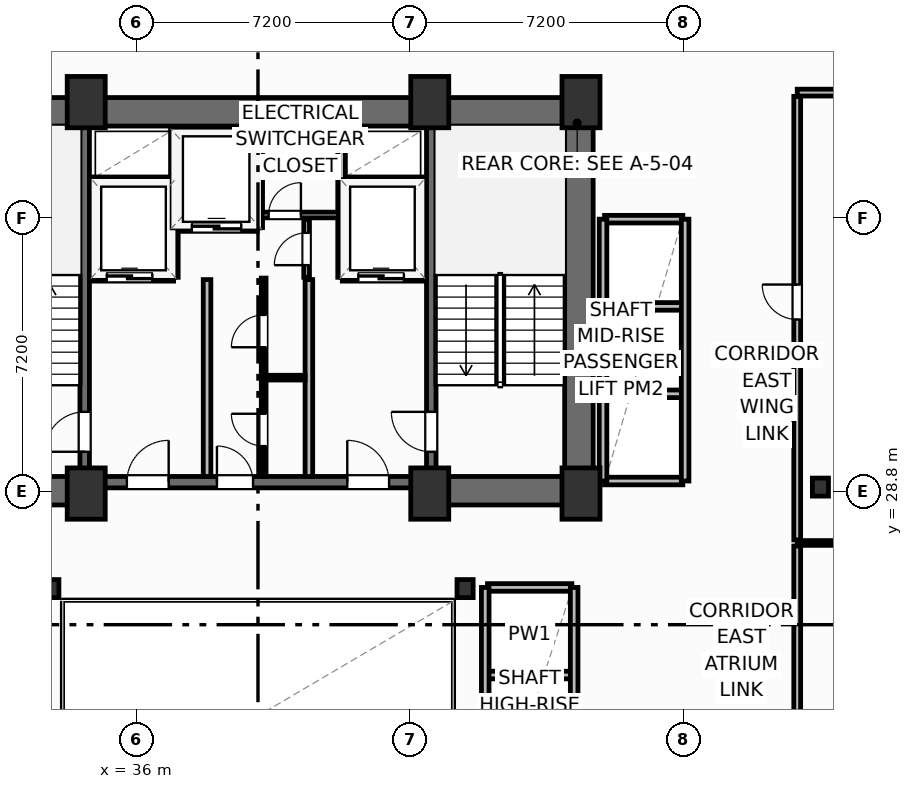
"""IFC4 building model, lengths in metres.
Left out: names, types, materials, properties, quantities, classifications, styles, units other than length and angle.
Written with IfcOpenShell. Run it as: python <this file> out.ifc"""

import sys

from ifc_helpers import new_model, si_unit, direction, frame, frame_2d, origin, origin_2d, place, context, subcontext, project, spatial, rectangle, i_section, extrude, element, fill, save


model = new_model("IFC4")
c1 = context("Model", 3, precision=1e-05, world=origin(), true_north=direction((0.0, 1.0)))
c2 = subcontext(c1, "Body", "Model", "MODEL_VIEW")
j1 = project(units=[si_unit("LENGTHUNIT", "METRE"), si_unit("PLANEANGLEUNIT", "RADIAN")], contexts=[c1])
p1 = place(None, origin())
s1 = spatial("IfcSite", under=j1, at=p1, CompositionType="ELEMENT")
p2 = place(p1, origin())
s2 = spatial("IfcBuilding", under=s1, at=p2, CompositionType="ELEMENT")
p3 = place(p2, frame((0.0, 0.0, 91.0)))
s3 = spatial("IfcBuildingStorey", under=s2, at=p3, CompositionType="ELEMENT", Elevation=91.0)
for number, where, z_axis, x_axis in (
    (1, (34.68, 28.75, 0.0), (0.0, 0.0, 1.0), (1.0, 0.0, 0.0)),
    (2, (43.72, 28.75, 0.0), (0.0, 0.0, 1.0), (1.0, 0.0, 0.0)),
    (3, (47.7, 28.75, 0.0), (0.0, 0.0, 1.0), (1.0, 0.0, 0.0)),
    (4, (34.68, 39.05, 0.0), (0.0, 0.0, 1.0), (1.0, 0.0, 0.0)),
    (5, (43.72, 39.05, 0.0), (0.0, 0.0, 1.0), (1.0, 0.0, 0.0)),
    (6, (47.7, 39.05, 0.0), (0.0, 0.0, 1.0), (1.0, 0.0, 0.0)),
):
    element("IfcColumn", number, at=place(p3, frame(where, z_axis=z_axis, x_axis=x_axis)), inside=s3, PredefinedType="COLUMN", context=c2, shape_type="SweptSolid", body=[
        extrude(rectangle(XDim=1.0, YDim=1.35, at=origin_2d()), origin(), (0.0, 0.0, 1.0), 3.7),
    ])
for number, where, z_axis, x_axis in (
    (7, (33.75, 26.25, 0.0), (0.0, 0.0, 1.0), (1.0, 0.0, 0.0)),
    (8, (44.65, 26.25, 0.0), (0.0, 0.0, 1.0), (1.0, 0.0, 0.0)),
    (9, (54.0, 28.92, 0.0), (0.0, 0.0, 1.0), (1.0, 0.0, 0.0)),
):
    element("IfcColumn", number, at=place(p3, frame(where, z_axis=z_axis, x_axis=x_axis)), inside=s3, PredefinedType="COLUMN", context=c2, shape_type="SweptSolid", body=[
        extrude(i_section(OverallWidth=0.424, OverallDepth=0.474, WebThickness=0.048, FlangeThickness=0.077, FilletRadius=0.025, at=origin_2d()), origin(), (0.0, 0.0, 1.0), 3.7),
    ])
p4 = place(p3, frame((30.38, 38.795, 0.0), z_axis=(0.0, 0.0, 1.0), x_axis=(1.0, 0.0, 0.0)))
e10 = element("IfcWall", 10, at=p4, inside=s3, PredefinedType="SHEAR", context=c2, shape_type="SweptSolid", body=[
    extrude(rectangle(XDim=17.64, YDim=0.75, at=frame_2d((8.82, 0.0))), origin(), (0.0, 0.0, 1.0), 3.45),
])
p5 = place(p3, frame((47.645, 29.2, 0.0), z_axis=(0.0, 0.0, 1.0), x_axis=(0.0, 1.0, 0.0)))
e11 = element("IfcWall", 11, at=p5, inside=s3, PredefinedType="SHEAR", context=c2, shape_type="SweptSolid", body=[
    extrude(rectangle(XDim=9.22, YDim=0.75, at=frame_2d((4.61, 0.0))), origin(), (0.0, 0.0, 1.0), 3.45),
])
p6 = place(p3, frame((30.38, 28.825, 0.0), z_axis=(0.0, 0.0, 1.0), x_axis=(1.0, 0.0, 0.0)))
e12 = element("IfcWall", 12, at=p6, inside=s3, PredefinedType="SHEAR", context=c2, shape_type="SweptSolid", body=[
    extrude(rectangle(XDim=4.42, YDim=0.75, at=frame_2d((2.21, 0.0))), origin(), (0.0, 0.0, 1.0), 3.45),
])
p7 = place(p3, frame((43.6, 28.825, 0.0), z_axis=(0.0, 0.0, 1.0), x_axis=(1.0, 0.0, 0.0)))
e13 = element("IfcWall", 13, at=p7, inside=s3, PredefinedType="SHEAR", context=c2, shape_type="SweptSolid", body=[
    extrude(rectangle(XDim=4.42, YDim=0.75, at=frame_2d((2.21, 0.0))), origin(), (0.0, 0.0, 1.0), 3.45),
])
p8 = place(p3, frame((34.8, 29.05, 0.0), z_axis=(0.0, 0.0, 1.0), x_axis=(1.0, 0.0, 0.0)))
e14 = element("IfcWall", 14, at=p8, inside=s3, PredefinedType="SHEAR", context=c2, shape_type="SweptSolid", body=[
    extrude(rectangle(XDim=8.8, YDim=0.3, at=frame_2d((4.4, 0.0))), origin(), (0.0, 0.0, 1.0), 3.45),
])
p9 = place(p8, frame((0.95, 0.0, 0.0)))
e15 = element("IfcOpeningElement", 15, at=p9, cuts=e14, PredefinedType="OPENING", context=c2, shape_type="SweptSolid", body=[
    extrude(rectangle(XDim=1.1, YDim=2.15, at=frame_2d((0.55, 1.075))), frame((0.0, 0.16, 0.0), z_axis=(0.0, -1.0, 0.0), x_axis=(1.0, 0.0, 0.0)), (0.0, 0.0, 1.0), 0.32),
])
p10 = place(p8, frame((6.75, 0.0, 0.0)))
e16 = element("IfcOpeningElement", 16, at=p10, cuts=e14, PredefinedType="OPENING", context=c2, shape_type="SweptSolid", body=[
    extrude(rectangle(XDim=1.1, YDim=2.15, at=frame_2d((0.55, 1.075))), frame((0.0, 0.16, 0.0), z_axis=(0.0, -1.0, 0.0), x_axis=(1.0, 0.0, 0.0)), (0.0, 0.0, 1.0), 0.32),
])
p11 = place(p8, frame((3.32, 0.0, 0.0)))
e17 = element("IfcOpeningElement", 17, at=p11, cuts=e14, PredefinedType="OPENING", context=c2, shape_type="SweptSolid", body=[
    extrude(rectangle(XDim=0.95, YDim=2.15, at=frame_2d((0.475, 1.075))), frame((0.0, 0.16, 0.0), z_axis=(0.0, -1.0, 0.0), x_axis=(1.0, 0.0, 0.0)), (0.0, 0.0, 1.0), 0.32),
])
p12 = place(p3, frame((34.64, 29.2, 0.0), z_axis=(0.0, 0.0, 1.0), x_axis=(0.0, 1.0, 0.0)))
e18 = element("IfcWall", 18, at=p12, inside=s3, PredefinedType="SHEAR", context=c2, shape_type="SweptSolid", body=[
    extrude(rectangle(XDim=9.22, YDim=0.25, at=frame_2d((4.61, 0.0))), origin(), (0.0, 0.0, 1.0), 3.45),
])
p13 = place(p12, frame((0.65, 0.0, 0.0)))
e19 = element("IfcOpeningElement", 19, at=p13, cuts=e18, PredefinedType="OPENING", context=c2, shape_type="SweptSolid", body=[
    extrude(rectangle(XDim=1.05, YDim=2.15, at=frame_2d((0.525, 1.075))), frame((0.0, 0.135, 0.0), z_axis=(0.0, -1.0, 0.0), x_axis=(1.0, 0.0, 0.0)), (0.0, 0.0, 1.0), 0.27),
])
p14 = place(p3, frame((43.76, 29.2, 0.0), z_axis=(0.0, 0.0, 1.0), x_axis=(0.0, 1.0, 0.0)))
e20 = element("IfcWall", 20, at=p14, inside=s3, PredefinedType="SHEAR", context=c2, shape_type="SweptSolid", body=[
    extrude(rectangle(XDim=9.22, YDim=0.25, at=frame_2d((4.61, 0.0))), origin(), (0.0, 0.0, 1.0), 3.45),
])
p15 = place(p14, frame((0.65, 0.0, 0.0)))
e21 = element("IfcOpeningElement", 21, at=p15, cuts=e20, PredefinedType="OPENING", context=c2, shape_type="SweptSolid", body=[
    extrude(rectangle(XDim=1.05, YDim=2.15, at=frame_2d((0.525, 1.075))), frame((0.0, 0.135, 0.0), z_axis=(0.0, -1.0, 0.0), x_axis=(1.0, 0.0, 0.0)), (0.0, 0.0, 1.0), 0.27),
])
p16 = place(p3, frame((53.39, 19.3, 0.0), z_axis=(0.0, 0.0, 1.0), x_axis=(0.0, 1.0, 0.0)))
e22 = element("IfcWall", 22, at=p16, inside=s3, PredefinedType="PARTITIONING", context=c2, shape_type="SweptSolid", body=[
    extrude(rectangle(XDim=8.07, YDim=0.18, at=frame_2d((4.035, 0.0))), origin(), (0.0, 0.0, 1.0), 3.45),
])
p17 = place(p16, frame((2.2, 0.0, 0.0)))
e23 = element("IfcOpeningElement", 23, at=p17, cuts=e22, PredefinedType="OPENING", context=c2, shape_type="SweptSolid", body=[
    extrude(rectangle(XDim=0.92, YDim=2.05, at=frame_2d((0.46, 1.025))), frame((0.0, 0.1, 0.0), z_axis=(0.0, -1.0, 0.0), x_axis=(1.0, 0.0, 0.0)), (0.0, 0.0, 1.0), 0.2),
])
p18 = place(p3, frame((53.39, 27.53, 0.0), z_axis=(0.0, 0.0, 1.0), x_axis=(0.0, 1.0, 0.0)))
e24 = element("IfcWall", 24, at=p18, inside=s3, PredefinedType="PARTITIONING", context=c2, shape_type="SweptSolid", body=[
    extrude(rectangle(XDim=11.67, YDim=0.18, at=frame_2d((5.835, 0.0))), origin(), (0.0, 0.0, 1.0), 3.45),
])
p19 = place(p18, frame((5.8, 0.0, 0.0)))
e25 = element("IfcOpeningElement", 25, at=p19, cuts=e24, PredefinedType="OPENING", context=c2, shape_type="SweptSolid", body=[
    extrude(rectangle(XDim=0.92, YDim=2.05, at=frame_2d((0.46, 1.025))), frame((0.0, 0.1, 0.0), z_axis=(0.0, -1.0, 0.0), x_axis=(1.0, 0.0, 0.0)), (0.0, 0.0, 1.0), 0.2),
])
p20 = place(p3, frame((53.39, 27.45, 0.0), z_axis=(0.0, 0.0, 1.0), x_axis=(1.0, 0.0, 0.0)))
e26 = element("IfcWall", 26, at=p20, inside=s3, PredefinedType="PARTITIONING", context=c2, shape_type="SweptSolid", body=[
    extrude(rectangle(XDim=23.61, YDim=0.125, at=frame_2d((11.805, 0.0))), origin(), (0.0, 0.0, 1.0), 3.45),
])
p21 = place(p3, frame((53.39, 39.3, 0.0), z_axis=(0.0, 0.0, 1.0), x_axis=(1.0, 0.0, 0.0)))
e27 = element("IfcWall", 27, at=p21, inside=s3, PredefinedType="PARTITIONING", context=c2, shape_type="SweptSolid", body=[
    extrude(rectangle(XDim=8.876, YDim=0.18, at=frame_2d((4.438, 0.0))), origin(), (0.0, 0.0, 1.0), 3.45),
])
for number, where, z_axis, x_axis in (
    (28, (37.86, 29.2, 0.0), (0.0, 0.0, 1.0), (0.0, 1.0, 0.0)),
    (29, (40.54, 29.2, 0.0), (0.0, 0.0, 1.0), (0.0, 1.0, 0.0)),
):
    element("IfcWall", number, at=place(p3, frame(where, z_axis=z_axis, x_axis=x_axis)), inside=s3, PredefinedType="PARTITIONING", context=c2, shape_type="SweptSolid", body=[
        extrude(rectangle(XDim=5.18, YDim=0.2, at=frame_2d((2.59, 0.0))), origin(), (0.0, 0.0, 1.0), 3.45),
    ])
p22 = place(p3, frame((34.8, 34.44, 0.0), z_axis=(0.0, 0.0, 1.0), x_axis=(1.0, 0.0, 0.0)))
e30 = element("IfcWall", 30, at=p22, inside=s3, PredefinedType="PARTITIONING", context=c2, shape_type="SweptSolid", body=[
    extrude(rectangle(XDim=2.18, YDim=0.2, at=frame_2d((1.09, 0.0))), origin(), (0.0, 0.0, 1.0), 3.45),
])
p23 = place(p22, frame((0.42, 0.0, 0.0)))
e31 = element("IfcOpeningElement", 31, at=p23, cuts=e30, PredefinedType="OPENING", context=c2, shape_type="SweptSolid", body=[
    extrude(rectangle(XDim=1.2, YDim=2.2, at=frame_2d((0.6, 1.1))), frame((0.0, 0.11, 0.0), z_axis=(0.0, -1.0, 0.0), x_axis=(1.0, 0.0, 0.0)), (0.0, 0.0, 1.0), 0.22),
])
p24 = place(p3, frame((34.8, 36.98, 0.0), z_axis=(0.0, 0.0, 1.0), x_axis=(1.0, 0.0, 0.0)))
e32 = element("IfcWall", 32, at=p24, inside=s3, PredefinedType="PARTITIONING", context=c2, shape_type="SweptSolid", body=[
    extrude(rectangle(XDim=2.18, YDim=0.2, at=frame_2d((1.09, 0.0))), origin(), (0.0, 0.0, 1.0), 3.45),
])
p25 = place(p3, frame((37.0, 34.44, 0.0), z_axis=(0.0, 0.0, 1.0), x_axis=(0.0, 1.0, 0.0)))
e33 = element("IfcWall", 33, at=p25, inside=s3, PredefinedType="PARTITIONING", context=c2, shape_type="SweptSolid", body=[
    extrude(rectangle(XDim=3.9, YDim=0.2, at=frame_2d((1.95, 0.0))), origin(), (0.0, 0.0, 1.0), 3.45),
])
p26 = place(p3, frame((41.42, 34.44, 0.0), z_axis=(0.0, 0.0, 1.0), x_axis=(1.0, 0.0, 0.0)))
e34 = element("IfcWall", 34, at=p26, inside=s3, PredefinedType="PARTITIONING", context=c2, shape_type="SweptSolid", body=[
    extrude(rectangle(XDim=2.18, YDim=0.2, at=frame_2d((1.09, 0.0))), origin(), (0.0, 0.0, 1.0), 3.45),
])
p27 = place(p26, frame((0.42, 0.0, 0.0)))
e35 = element("IfcOpeningElement", 35, at=p27, cuts=e34, PredefinedType="OPENING", context=c2, shape_type="SweptSolid", body=[
    extrude(rectangle(XDim=1.2, YDim=2.2, at=frame_2d((0.6, 1.1))), frame((0.0, 0.11, 0.0), z_axis=(0.0, -1.0, 0.0), x_axis=(1.0, 0.0, 0.0)), (0.0, 0.0, 1.0), 0.22),
])
p28 = place(p3, frame((41.42, 36.98, 0.0), z_axis=(0.0, 0.0, 1.0), x_axis=(1.0, 0.0, 0.0)))
e36 = element("IfcWall", 36, at=p28, inside=s3, PredefinedType="PARTITIONING", context=c2, shape_type="SweptSolid", body=[
    extrude(rectangle(XDim=2.18, YDim=0.2, at=frame_2d((1.09, 0.0))), origin(), (0.0, 0.0, 1.0), 3.45),
])
p29 = place(p3, frame((41.4, 34.44, 0.0), z_axis=(0.0, 0.0, 1.0), x_axis=(0.0, 1.0, 0.0)))
e37 = element("IfcWall", 37, at=p29, inside=s3, PredefinedType="PARTITIONING", context=c2, shape_type="SweptSolid", body=[
    extrude(rectangle(XDim=3.9, YDim=0.2, at=frame_2d((1.95, 0.0))), origin(), (0.0, 0.0, 1.0), 3.45),
])
p30 = place(p3, frame((37.06, 35.75, 0.0), z_axis=(0.0, 0.0, 1.0), x_axis=(1.0, 0.0, 0.0)))
e38 = element("IfcWall", 38, at=p30, inside=s3, PredefinedType="PARTITIONING", context=c2, shape_type="SweptSolid", body=[
    extrude(rectangle(XDim=2.12, YDim=0.2, at=frame_2d((1.06, 0.0))), origin(), (0.0, 0.0, 1.0), 3.45),
])
p31 = place(p30, frame((0.4, 0.0, 0.0)))
e39 = element("IfcOpeningElement", 39, at=p31, cuts=e38, PredefinedType="OPENING", context=c2, shape_type="SweptSolid", body=[
    extrude(rectangle(XDim=1.3, YDim=2.2, at=frame_2d((0.65, 1.1))), frame((0.0, 0.11, 0.0), z_axis=(0.0, -1.0, 0.0), x_axis=(1.0, 0.0, 0.0)), (0.0, 0.0, 1.0), 0.22),
])
p32 = place(p3, frame((39.22, 35.75, 0.0), z_axis=(0.0, 0.0, 1.0), x_axis=(0.0, 1.0, 0.0)))
e40 = element("IfcWall", 40, at=p32, inside=s3, PredefinedType="PARTITIONING", context=c2, shape_type="SweptSolid", body=[
    extrude(rectangle(XDim=2.59, YDim=0.2, at=frame_2d((1.295, 0.0))), origin(), (0.0, 0.0, 1.0), 3.45),
])
p33 = place(p3, frame((39.3, 36.08, 0.0), z_axis=(0.0, 0.0, 1.0), x_axis=(1.0, 0.0, 0.0)))
e41 = element("IfcWall", 41, at=p33, inside=s3, PredefinedType="PARTITIONING", context=c2, shape_type="SweptSolid", body=[
    extrude(rectangle(XDim=2.02, YDim=0.15, at=frame_2d((1.01, 0.0))), origin(), (0.0, 0.0, 1.0), 3.45),
])
p34 = place(p33, frame((0.18, 0.0, 0.0)))
e42 = element("IfcOpeningElement", 42, at=p34, cuts=e41, PredefinedType="OPENING", context=c2, shape_type="SweptSolid", body=[
    extrude(rectangle(XDim=0.85, YDim=2.05, at=frame_2d((0.425, 1.025))), frame((0.0, 0.085, 0.0), z_axis=(0.0, -1.0, 0.0), x_axis=(1.0, 0.0, 0.0)), (0.0, 0.0, 1.0), 0.17),
])
p35 = place(p3, frame((40.48, 34.44, 0.0), z_axis=(0.0, 0.0, 1.0), x_axis=(0.0, 1.0, 0.0)))
e43 = element("IfcWall", 43, at=p35, inside=s3, PredefinedType="PARTITIONING", context=c2, shape_type="SweptSolid", body=[
    extrude(rectangle(XDim=1.52, YDim=0.15, at=frame_2d((0.76, 0.0))), origin(), (0.0, 0.0, 1.0), 3.45),
])
p36 = place(p35, frame((0.32, 0.0, 0.0)))
e44 = element("IfcOpeningElement", 44, at=p36, cuts=e43, PredefinedType="OPENING", context=c2, shape_type="SweptSolid", body=[
    extrude(rectangle(XDim=0.85, YDim=2.05, at=frame_2d((0.425, 1.025))), frame((0.0, 0.085, 0.0), z_axis=(0.0, -1.0, 0.0), x_axis=(1.0, 0.0, 0.0)), (0.0, 0.0, 1.0), 0.17),
])
p37 = place(p3, frame((39.35, 31.8, 0.0), z_axis=(0.0, 0.0, 1.0), x_axis=(1.0, 0.0, 0.0)))
e45 = element("IfcWall", 45, at=p37, inside=s3, PredefinedType="PARTITIONING", context=c2, shape_type="SweptSolid", body=[
    extrude(rectangle(XDim=1.09, YDim=0.125, at=frame_2d((0.545, 0.0))), origin(), (0.0, 0.0, 1.0), 3.45),
])
p38 = place(p3, frame((39.35, 29.2, 0.0), z_axis=(0.0, 0.0, 1.0), x_axis=(0.0, 1.0, 0.0)))
e46 = element("IfcWall", 46, at=p38, inside=s3, PredefinedType="PARTITIONING", context=c2, shape_type="SweptSolid", body=[
    extrude(rectangle(XDim=5.22, YDim=0.125, at=frame_2d((2.61, 0.0))), origin(), (0.0, 0.0, 1.0), 3.45),
])
p39 = place(p38, frame((0.8, 0.0, 0.0)))
e47 = element("IfcOpeningElement", 47, at=p39, cuts=e46, PredefinedType="OPENING", context=c2, shape_type="SweptSolid", body=[
    extrude(rectangle(XDim=0.85, YDim=2.05, at=frame_2d((0.425, 1.025))), frame((0.0, 0.073, 0.0), z_axis=(0.0, -1.0, 0.0), x_axis=(1.0, 0.0, 0.0)), (0.0, 0.0, 1.0), 0.145),
])
p40 = place(p38, frame((3.4, 0.0, 0.0)))
e48 = element("IfcOpeningElement", 48, at=p40, cuts=e46, PredefinedType="OPENING", context=c2, shape_type="SweptSolid", body=[
    extrude(rectangle(XDim=0.85, YDim=2.05, at=frame_2d((0.425, 1.025))), frame((0.0, 0.073, 0.0), z_axis=(0.0, -1.0, 0.0), x_axis=(1.0, 0.0, 0.0)), (0.0, 0.0, 1.0), 0.145),
])
for number, where, z_axis, x_axis in (
    (49, (48.32, 31.375, 0.0), (0.0, 0.0, 1.0), (1.0, 0.0, 0.0)),
    (50, (48.32, 33.675, 0.0), (0.0, 0.0, 1.0), (1.0, 0.0, 0.0)),
):
    element("IfcWall", number, at=place(p3, frame(where, z_axis=z_axis, x_axis=x_axis)), inside=s3, PredefinedType="PARTITIONING", context=c2, shape_type="SweptSolid", body=[
        extrude(rectangle(XDim=2.06, YDim=0.2, at=frame_2d((1.03, 0.0))), origin(), (0.0, 0.0, 1.0), 3.45),
    ])
p41 = place(p3, frame((48.32, 29.08, 0.0), z_axis=(0.0, 0.0, 1.0), x_axis=(1.0, 0.0, 0.0)))
e51 = element("IfcWall", 51, at=p41, inside=s3, PredefinedType="PARTITIONING", context=c2, shape_type="SweptSolid", body=[
    extrude(rectangle(XDim=2.06, YDim=0.2, at=frame_2d((1.03, 0.0))), origin(), (0.0, 0.0, 1.0), 2.662),
])
p42 = place(p3, frame((48.32, 35.97, 0.0), z_axis=(0.0, 0.0, 1.0), x_axis=(1.0, 0.0, 0.0)))
e52 = element("IfcWall", 52, at=p42, inside=s3, PredefinedType="PARTITIONING", context=c2, shape_type="SweptSolid", body=[
    extrude(rectangle(XDim=2.06, YDim=0.2, at=frame_2d((1.03, 0.0))), origin(), (0.0, 0.0, 1.0), 3.45),
])
for number, where, z_axis, x_axis in (
    (53, (48.28, 29.08, 0.0), (0.0, 0.0, 1.0), (0.0, 1.0, 0.0)),
    (54, (50.44, 29.08, 0.0), (0.0, 0.0, 1.0), (0.0, 1.0, 0.0)),
):
    element("IfcWall", number, at=place(p3, frame(where, z_axis=z_axis, x_axis=x_axis)), inside=s3, PredefinedType="PARTITIONING", context=c2, shape_type="SweptSolid", body=[
        extrude(rectangle(XDim=6.89, YDim=0.2, at=frame_2d((3.445, 0.0))), origin(), (0.0, 0.0, 1.0), 3.45),
    ])
for number, where, z_axis, x_axis in (
    (55, (45.24, 23.975, 0.0), (0.0, 0.0, 1.0), (1.0, 0.0, 0.0)),
    (56, (45.24, 26.28, 0.0), (0.0, 0.0, 1.0), (1.0, 0.0, 0.0)),
):
    element("IfcWall", number, at=place(p3, frame(where, z_axis=z_axis, x_axis=x_axis)), inside=s3, PredefinedType="PARTITIONING", context=c2, shape_type="SweptSolid", body=[
        extrude(rectangle(XDim=2.22, YDim=0.2, at=frame_2d((1.11, 0.0))), origin(), (0.0, 0.0, 1.0), 3.45),
    ])
for number, where, z_axis, x_axis in (
    (57, (45.18, 19.38, 0.0), (0.0, 0.0, 1.0), (0.0, 1.0, 0.0)),
    (58, (47.52, 19.38, 0.0), (0.0, 0.0, 1.0), (0.0, 1.0, 0.0)),
):
    element("IfcWall", number, at=place(p3, frame(where, z_axis=z_axis, x_axis=x_axis)), inside=s3, PredefinedType="PARTITIONING", context=c2, shape_type="SweptSolid", body=[
        extrude(rectangle(XDim=6.9, YDim=0.2, at=frame_2d((3.45, 0.0))), origin(), (0.0, 0.0, 1.0), 3.45),
    ])
p43 = place(p19, origin())
e59 = element("IfcDoor", 59, at=p43, inside=s3, OperationType="SINGLE_SWING_RIGHT", PredefinedType="DOOR", context=c2, shape_type="SweptSolid", body=[
    extrude(rectangle(XDim=0.92, YDim=2.05, at=frame_2d((0.46, 1.025))), frame((0.0, 0.025, 0.0), z_axis=(0.0, -1.0, 0.0), x_axis=(1.0, 0.0, 0.0)), (0.0, 0.0, 1.0), 0.05),
])
fill(e25, e59)
p44 = place(p13, origin())
e60 = element("IfcDoor", 60, at=p44, inside=s3, OperationType="SINGLE_SWING_LEFT", PredefinedType="DOOR", context=c2, shape_type="SweptSolid", body=[
    extrude(rectangle(XDim=1.05, YDim=2.15, at=frame_2d((0.525, 1.075))), frame((0.0, 0.025, 0.0), z_axis=(0.0, -1.0, 0.0), x_axis=(1.0, 0.0, 0.0)), (0.0, 0.0, 1.0), 0.05),
])
fill(e19, e60)
p45 = place(p15, origin())
e61 = element("IfcDoor", 61, at=p45, inside=s3, OperationType="SINGLE_SWING_RIGHT", PredefinedType="DOOR", context=c2, shape_type="SweptSolid", body=[
    extrude(rectangle(XDim=1.05, YDim=2.15, at=frame_2d((0.525, 1.075))), frame((0.0, 0.025, 0.0), z_axis=(0.0, -1.0, 0.0), x_axis=(1.0, 0.0, 0.0)), (0.0, 0.0, 1.0), 0.05),
])
fill(e21, e61)
p46 = place(p9, origin())
e62 = element("IfcDoor", 62, at=p46, inside=s3, OperationType="SINGLE_SWING_RIGHT", PredefinedType="DOOR", context=c2, shape_type="SweptSolid", body=[
    extrude(rectangle(XDim=1.1, YDim=2.15, at=frame_2d((0.55, 1.075))), frame((0.0, 0.025, 0.0), z_axis=(0.0, -1.0, 0.0), x_axis=(1.0, 0.0, 0.0)), (0.0, 0.0, 1.0), 0.05),
])
fill(e15, e62)
p47 = place(p10, origin())
e63 = element("IfcDoor", 63, at=p47, inside=s3, OperationType="SINGLE_SWING_LEFT", PredefinedType="DOOR", context=c2, shape_type="SweptSolid", body=[
    extrude(rectangle(XDim=1.1, YDim=2.15, at=frame_2d((0.55, 1.075))), frame((0.0, 0.025, 0.0), z_axis=(0.0, -1.0, 0.0), x_axis=(1.0, 0.0, 0.0)), (0.0, 0.0, 1.0), 0.05),
])
fill(e16, e63)
p48 = place(p23, origin())
e64 = element("IfcDoor", 64, at=p48, inside=s3, OperationType="SLIDING_TO_LEFT", PredefinedType="DOOR", context=c2, shape_type="SweptSolid", body=[
    extrude(rectangle(XDim=1.2, YDim=2.2, at=frame_2d((0.6, 1.1))), frame((0.0, 0.025, 0.0), z_axis=(0.0, -1.0, 0.0), x_axis=(1.0, 0.0, 0.0)), (0.0, 0.0, 1.0), 0.05),
])
fill(e31, e64)
p49 = place(p27, origin())
e65 = element("IfcDoor", 65, at=p49, inside=s3, OperationType="SLIDING_TO_LEFT", PredefinedType="DOOR", context=c2, shape_type="SweptSolid", body=[
    extrude(rectangle(XDim=1.2, YDim=2.2, at=frame_2d((0.6, 1.1))), frame((0.0, 0.025, 0.0), z_axis=(0.0, -1.0, 0.0), x_axis=(1.0, 0.0, 0.0)), (0.0, 0.0, 1.0), 0.05),
])
fill(e35, e65)
p50 = place(p31, origin())
e66 = element("IfcDoor", 66, at=p50, inside=s3, OperationType="SLIDING_TO_LEFT", PredefinedType="DOOR", context=c2, shape_type="SweptSolid", body=[
    extrude(rectangle(XDim=1.3, YDim=2.2, at=frame_2d((0.65, 1.1))), frame((0.0, 0.025, 0.0), z_axis=(0.0, -1.0, 0.0), x_axis=(1.0, 0.0, 0.0)), (0.0, 0.0, 1.0), 0.05),
])
fill(e39, e66)
p51 = place(p34, origin())
e67 = element("IfcDoor", 67, at=p51, inside=s3, OperationType="SINGLE_SWING_RIGHT", PredefinedType="DOOR", context=c2, shape_type="SweptSolid", body=[
    extrude(rectangle(XDim=0.85, YDim=2.05, at=frame_2d((0.425, 1.025))), frame((0.0, 0.025, 0.0), z_axis=(0.0, -1.0, 0.0), x_axis=(1.0, 0.0, 0.0)), (0.0, 0.0, 1.0), 0.05),
])
fill(e42, e67)
p52 = place(p36, origin())
e68 = element("IfcDoor", 68, at=p52, inside=s3, OperationType="SINGLE_SWING_LEFT", PredefinedType="DOOR", context=c2, shape_type="SweptSolid", body=[
    extrude(rectangle(XDim=0.85, YDim=2.05, at=frame_2d((0.425, 1.025))), frame((0.0, 0.025, 0.0), z_axis=(0.0, -1.0, 0.0), x_axis=(1.0, 0.0, 0.0)), (0.0, 0.0, 1.0), 0.05),
])
fill(e44, e68)
p53 = place(p39, origin())
e69 = element("IfcDoor", 69, at=p53, inside=s3, OperationType="SINGLE_SWING_RIGHT", PredefinedType="DOOR", context=c2, shape_type="SweptSolid", body=[
    extrude(rectangle(XDim=0.85, YDim=2.05, at=frame_2d((0.425, 1.025))), frame((0.0, 0.025, 0.0), z_axis=(0.0, -1.0, 0.0), x_axis=(1.0, 0.0, 0.0)), (0.0, 0.0, 1.0), 0.05),
])
fill(e47, e69)
p54 = place(p40, origin())
e70 = element("IfcDoor", 70, at=p54, inside=s3, OperationType="SINGLE_SWING_LEFT", PredefinedType="DOOR", context=c2, shape_type="SweptSolid", body=[
    extrude(rectangle(XDim=0.85, YDim=2.05, at=frame_2d((0.425, 1.025))), frame((0.0, 0.025, 0.0), z_axis=(0.0, -1.0, 0.0), x_axis=(1.0, 0.0, 0.0)), (0.0, 0.0, 1.0), 0.05),
])
fill(e48, e70)
p55 = place(p11, origin())
e71 = element("IfcDoor", 71, at=p55, inside=s3, OperationType="SINGLE_SWING_LEFT", PredefinedType="DOOR", context=c2, shape_type="SweptSolid", body=[
    extrude(rectangle(XDim=0.95, YDim=2.15, at=frame_2d((0.475, 1.075))), frame((0.0, 0.025, 0.0), z_axis=(0.0, -1.0, 0.0), x_axis=(1.0, 0.0, 0.0)), (0.0, 0.0, 1.0), 0.05),
])
fill(e17, e71)
save(model, sys.argv[1])
